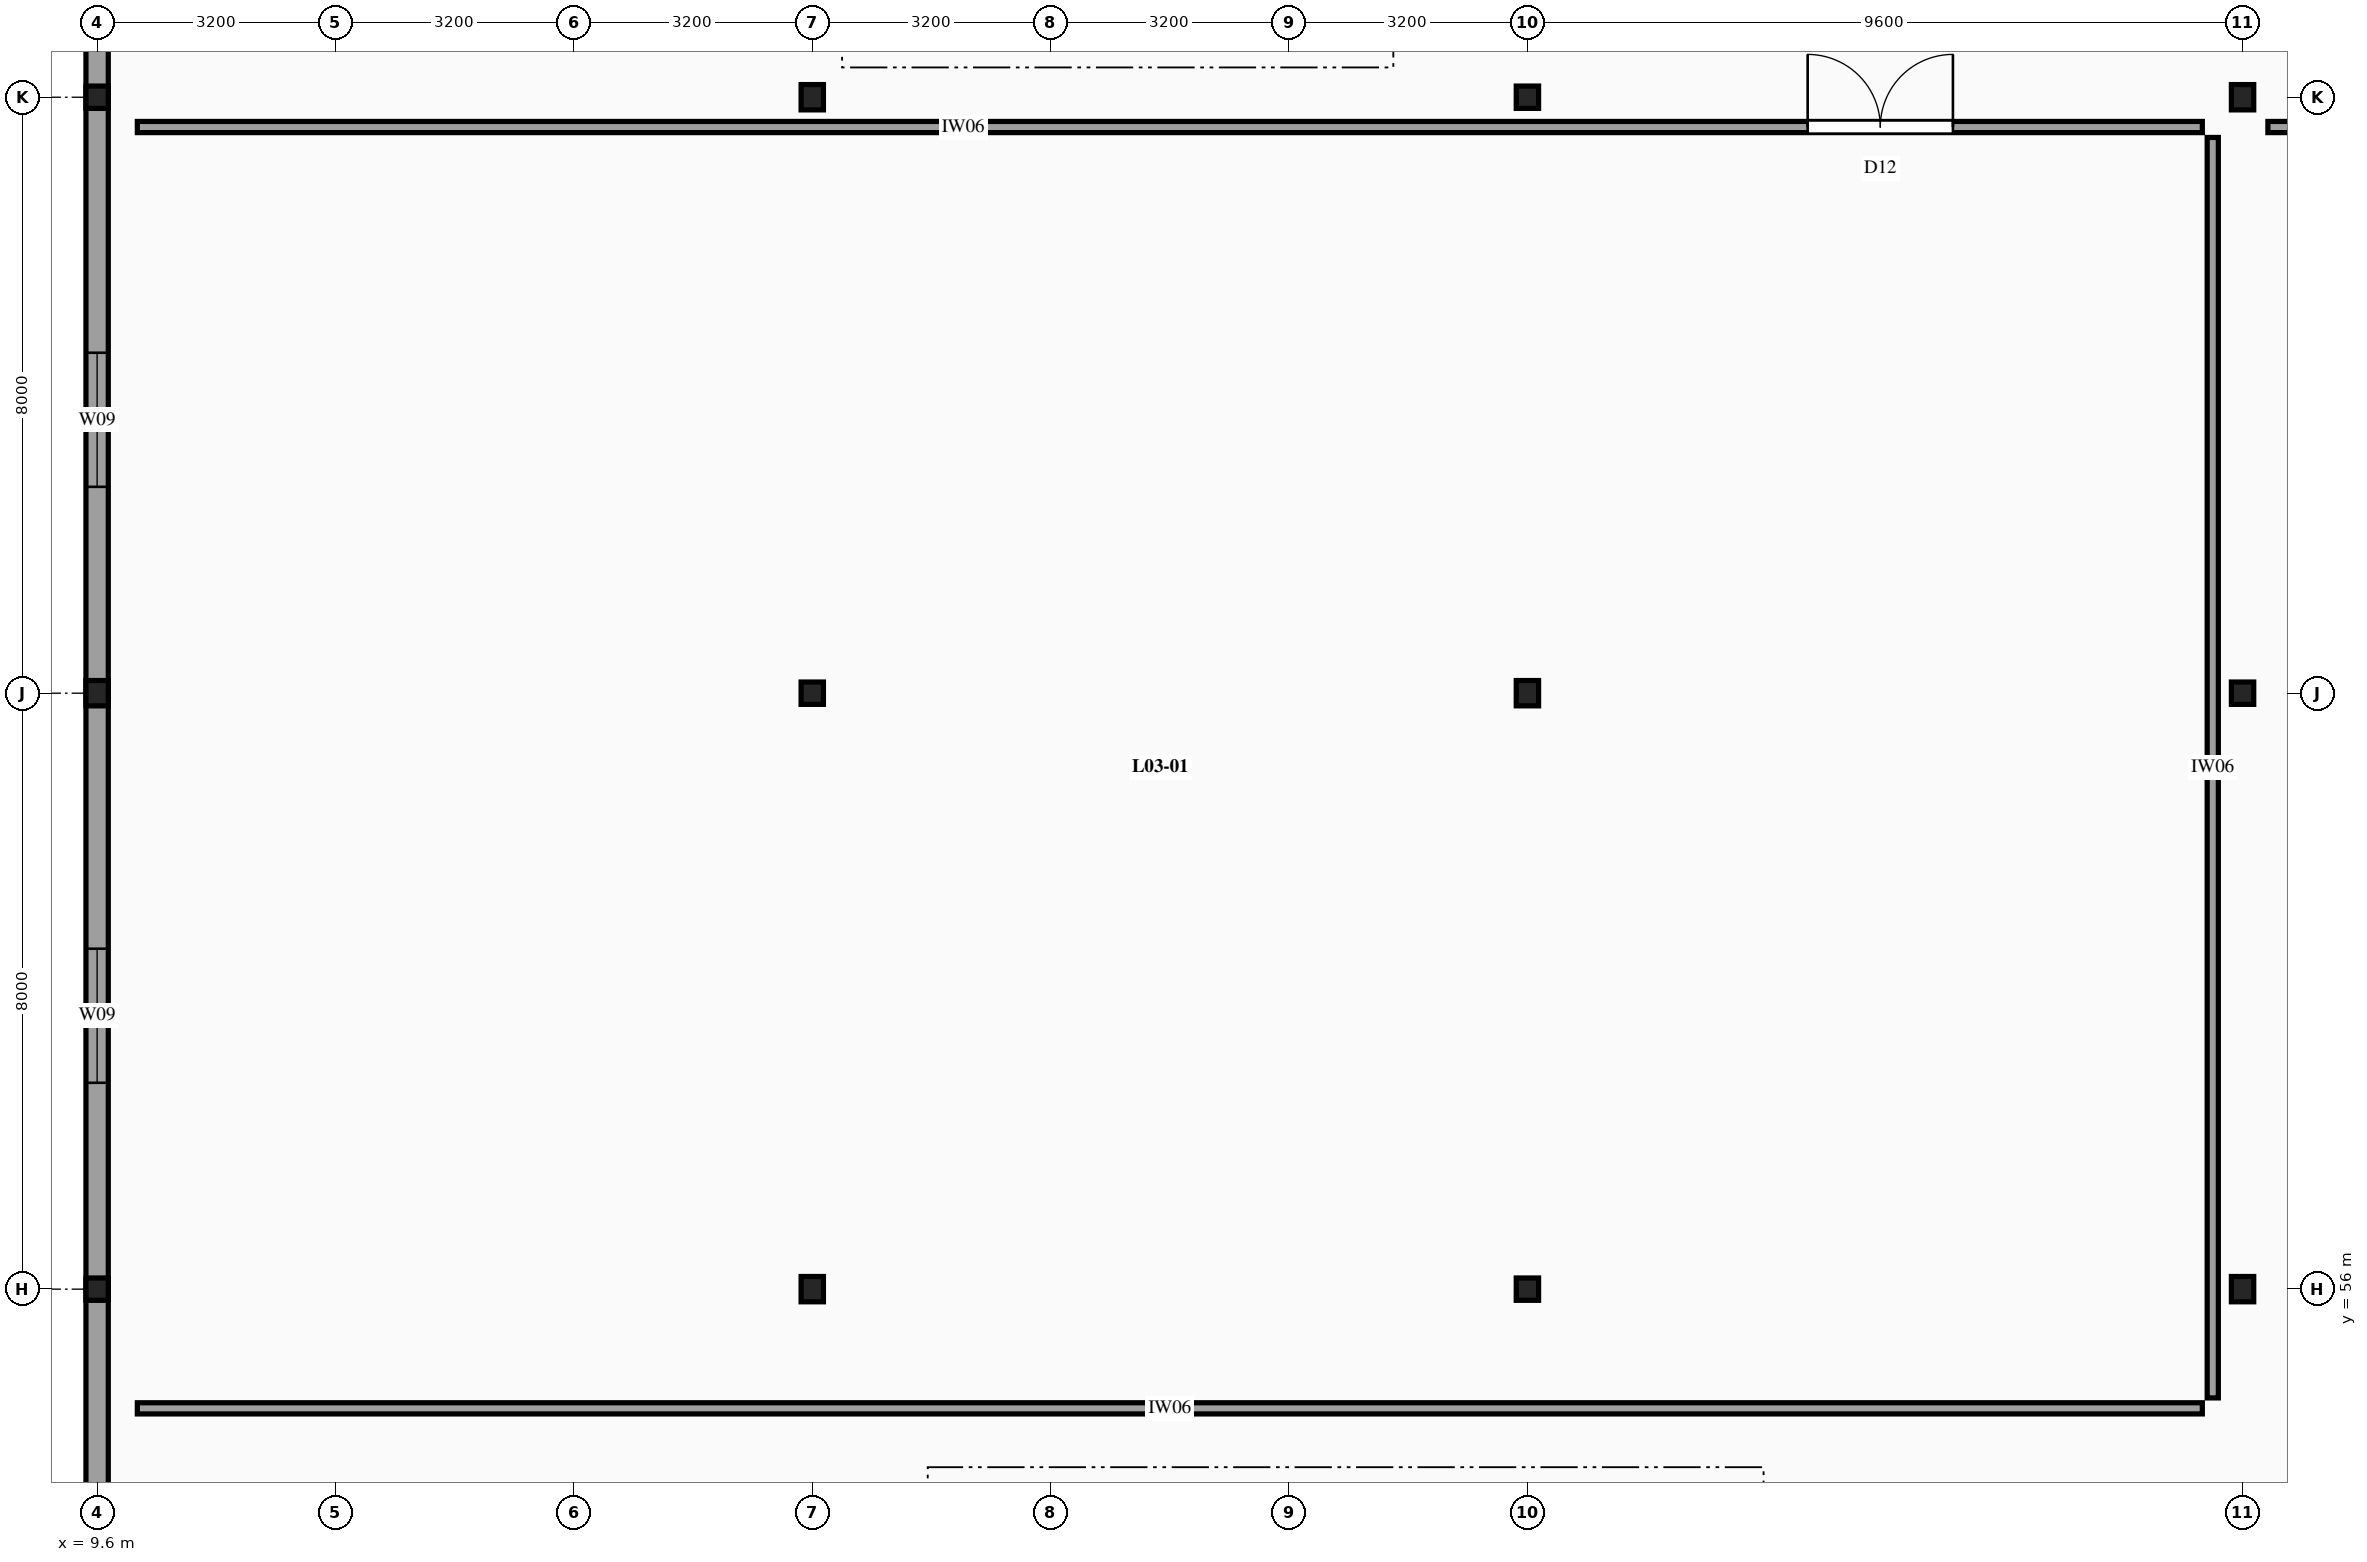
"""IFC4 building model, lengths in metres.
Left out: names, types, materials, properties, quantities, classifications, styles, units other than length and angle.
Written with IfcOpenShell. Run it as: python <this file> out.ifc"""

import sys

from ifc_helpers import new_model, si_unit, direction, frame, frame_2d, origin, origin_2d, place, context, subcontext, project, spatial, rectangle, i_section, extrude, element, fill, save


model = new_model("IFC4")
c1 = context("Model", 3, precision=1e-05, world=origin(), true_north=direction((0.0, 1.0)))
c2 = subcontext(c1, "Body", "Model", "MODEL_VIEW")
j1 = project(units=[si_unit("LENGTHUNIT", "METRE"), si_unit("PLANEANGLEUNIT", "RADIAN")], contexts=[c1])
p1 = place(None, origin())
s1 = spatial("IfcSite", under=j1, at=p1, CompositionType="ELEMENT")
p2 = place(p1, origin())
s2 = spatial("IfcBuilding", under=s1, at=p2, CompositionType="ELEMENT")
p3 = place(p2, frame((0.0, 0.0, 12.9)))
s3 = spatial("IfcBuildingStorey", under=s2, at=p3, CompositionType="ELEMENT", Elevation=12.9)
p4 = place(p3, frame((9.6, 56.0, -0.26), z_axis=(0.0, 0.0, 1.0), x_axis=(1.0, 0.0, 0.0)))
e1 = element("IfcColumn", 1, at=p4, inside=s3, PredefinedType="COLUMN", context=c2, shape_type="SweptSolid", body=[
    extrude(i_section(OverallWidth=0.3, OverallDepth=0.3, WebThickness=0.011, FlangeThickness=0.019, FilletRadius=0.027, at=origin_2d()), origin(), (0.0, 0.0, 1.0), 4.48),
])
p5 = place(p3, frame((9.6, 64.0, -0.26), z_axis=(0.0, 0.0, 1.0), x_axis=(1.0, 0.0, 0.0)))
e2 = element("IfcColumn", 2, at=p5, inside=s3, PredefinedType="COLUMN", context=c2, shape_type="SweptSolid", body=[
    extrude(i_section(OverallWidth=0.3, OverallDepth=0.34, WebThickness=0.012, FlangeThickness=0.021, FilletRadius=0.027, at=origin_2d()), origin(), (0.0, 0.0, 1.0), 4.48),
])
p6 = place(p3, frame((9.6, 72.0, -0.26), z_axis=(0.0, 0.0, 1.0), x_axis=(1.0, 0.0, 0.0)))
e3 = element("IfcColumn", 3, at=p6, inside=s3, PredefinedType="COLUMN", context=c2, shape_type="SweptSolid", body=[
    extrude(i_section(OverallWidth=0.3, OverallDepth=0.3, WebThickness=0.011, FlangeThickness=0.019, FilletRadius=0.027, at=origin_2d()), origin(), (0.0, 0.0, 1.0), 4.48),
])
p7 = place(p3, frame((19.2, 56.0, -0.26), z_axis=(0.0, 0.0, 1.0), x_axis=(1.0, 0.0, 0.0)))
e4 = element("IfcColumn", 4, at=p7, inside=s3, PredefinedType="COLUMN", context=c2, shape_type="SweptSolid", body=[
    extrude(i_section(OverallWidth=0.3, OverallDepth=0.34, WebThickness=0.012, FlangeThickness=0.021, FilletRadius=0.027, at=origin_2d()), origin(), (0.0, 0.0, 1.0), 4.48),
])
p8 = place(p3, frame((19.2, 64.0, -0.26), z_axis=(0.0, 0.0, 1.0), x_axis=(1.0, 0.0, 0.0)))
e5 = element("IfcColumn", 5, at=p8, inside=s3, PredefinedType="COLUMN", context=c2, shape_type="SweptSolid", body=[
    extrude(i_section(OverallWidth=0.3, OverallDepth=0.3, WebThickness=0.011, FlangeThickness=0.019, FilletRadius=0.027, at=origin_2d()), origin(), (0.0, 0.0, 1.0), 4.48),
])
p9 = place(p3, frame((19.2, 72.0, -0.26), z_axis=(0.0, 0.0, 1.0), x_axis=(1.0, 0.0, 0.0)))
e6 = element("IfcColumn", 6, at=p9, inside=s3, PredefinedType="COLUMN", context=c2, shape_type="SweptSolid", body=[
    extrude(i_section(OverallWidth=0.3, OverallDepth=0.34, WebThickness=0.012, FlangeThickness=0.021, FilletRadius=0.027, at=origin_2d()), origin(), (0.0, 0.0, 1.0), 4.48),
])
p10 = place(p3, frame((28.8, 56.0, -0.26), z_axis=(0.0, 0.0, 1.0), x_axis=(1.0, 0.0, 0.0)))
e7 = element("IfcColumn", 7, at=p10, inside=s3, PredefinedType="COLUMN", context=c2, shape_type="SweptSolid", body=[
    extrude(i_section(OverallWidth=0.3, OverallDepth=0.3, WebThickness=0.011, FlangeThickness=0.019, FilletRadius=0.027, at=origin_2d()), origin(), (0.0, 0.0, 1.0), 4.48),
])
p11 = place(p3, frame((28.8, 64.0, -0.26), z_axis=(0.0, 0.0, 1.0), x_axis=(1.0, 0.0, 0.0)))
e8 = element("IfcColumn", 8, at=p11, inside=s3, PredefinedType="COLUMN", context=c2, shape_type="SweptSolid", body=[
    extrude(i_section(OverallWidth=0.3, OverallDepth=0.34, WebThickness=0.012, FlangeThickness=0.021, FilletRadius=0.027, at=origin_2d()), origin(), (0.0, 0.0, 1.0), 4.48),
])
p12 = place(p3, frame((28.8, 72.0, -0.26), z_axis=(0.0, 0.0, 1.0), x_axis=(1.0, 0.0, 0.0)))
e9 = element("IfcColumn", 9, at=p12, inside=s3, PredefinedType="COLUMN", context=c2, shape_type="SweptSolid", body=[
    extrude(i_section(OverallWidth=0.3, OverallDepth=0.3, WebThickness=0.011, FlangeThickness=0.019, FilletRadius=0.027, at=origin_2d()), origin(), (0.0, 0.0, 1.0), 4.48),
])
p13 = place(p3, frame((38.4, 56.0, -0.26), z_axis=(0.0, 0.0, 1.0), x_axis=(1.0, 0.0, 0.0)))
e10 = element("IfcColumn", 10, at=p13, inside=s3, PredefinedType="COLUMN", context=c2, shape_type="SweptSolid", body=[
    extrude(i_section(OverallWidth=0.3, OverallDepth=0.34, WebThickness=0.012, FlangeThickness=0.021, FilletRadius=0.027, at=origin_2d()), origin(), (0.0, 0.0, 1.0), 4.48),
])
p14 = place(p3, frame((38.4, 64.0, -0.26), z_axis=(0.0, 0.0, 1.0), x_axis=(1.0, 0.0, 0.0)))
e11 = element("IfcColumn", 11, at=p14, inside=s3, PredefinedType="COLUMN", context=c2, shape_type="SweptSolid", body=[
    extrude(i_section(OverallWidth=0.3, OverallDepth=0.3, WebThickness=0.011, FlangeThickness=0.019, FilletRadius=0.027, at=origin_2d()), origin(), (0.0, 0.0, 1.0), 4.48),
])
p15 = place(p3, frame((38.4, 72.0, -0.26), z_axis=(0.0, 0.0, 1.0), x_axis=(1.0, 0.0, 0.0)))
e12 = element("IfcColumn", 12, at=p15, inside=s3, PredefinedType="COLUMN", context=c2, shape_type="SweptSolid", body=[
    extrude(i_section(OverallWidth=0.3, OverallDepth=0.34, WebThickness=0.012, FlangeThickness=0.021, FilletRadius=0.027, at=origin_2d()), origin(), (0.0, 0.0, 1.0), 4.48),
])
p16 = place(p3, frame((9.6, 48.02, 0.0), z_axis=(0.0, 0.0, 1.0), x_axis=(0.0, 1.0, 0.0)))
e13 = element("IfcWall", 13, at=p16, inside=s3, PredefinedType="SOLIDWALL", context=c2, shape_type="SweptSolid", body=[
    extrude(rectangle(XDim=7.96, YDim=0.3, at=frame_2d((3.98, 0.0))), origin(), (0.0, 0.0, 1.0), 3.54),
])
p17 = place(p16, frame((2.75, 0.0, 0.85)))
e14 = element("IfcOpeningElement", 14, at=p17, cuts=e13, PredefinedType="OPENING", context=c2, shape_type="SweptSolid", body=[
    extrude(rectangle(XDim=1.8, YDim=2.1, at=frame_2d((0.9, 1.05))), frame((0.0, 0.16, 0.0), z_axis=(0.0, -1.0, 0.0), x_axis=(1.0, 0.0, 0.0)), (0.0, 0.0, 1.0), 0.32),
])
p18 = place(p3, frame((9.6, 56.02, 0.0), z_axis=(0.0, 0.0, 1.0), x_axis=(0.0, 1.0, 0.0)))
e15 = element("IfcWall", 15, at=p18, inside=s3, PredefinedType="SOLIDWALL", context=c2, shape_type="SweptSolid", body=[
    extrude(rectangle(XDim=7.96, YDim=0.3, at=frame_2d((3.98, 0.0))), origin(), (0.0, 0.0, 1.0), 3.54),
])
p19 = place(p18, frame((2.75, 0.0, 0.85)))
e16 = element("IfcOpeningElement", 16, at=p19, cuts=e15, PredefinedType="OPENING", context=c2, shape_type="SweptSolid", body=[
    extrude(rectangle(XDim=1.8, YDim=2.1, at=frame_2d((0.9, 1.05))), frame((0.0, 0.16, 0.0), z_axis=(0.0, -1.0, 0.0), x_axis=(1.0, 0.0, 0.0)), (0.0, 0.0, 1.0), 0.32),
])
p20 = place(p3, frame((9.6, 64.02, 0.0), z_axis=(0.0, 0.0, 1.0), x_axis=(0.0, 1.0, 0.0)))
e17 = element("IfcWall", 17, at=p20, inside=s3, PredefinedType="SOLIDWALL", context=c2, shape_type="SweptSolid", body=[
    extrude(rectangle(XDim=7.96, YDim=0.3, at=frame_2d((3.98, 0.0))), origin(), (0.0, 0.0, 1.0), 3.54),
])
p21 = place(p20, frame((2.75, 0.0, 0.85)))
e18 = element("IfcOpeningElement", 18, at=p21, cuts=e17, PredefinedType="OPENING", context=c2, shape_type="SweptSolid", body=[
    extrude(rectangle(XDim=1.8, YDim=2.1, at=frame_2d((0.9, 1.05))), frame((0.0, 0.16, 0.0), z_axis=(0.0, -1.0, 0.0), x_axis=(1.0, 0.0, 0.0)), (0.0, 0.0, 1.0), 0.32),
])
p22 = place(p3, frame((9.6, 72.02, 0.0), z_axis=(0.0, 0.0, 1.0), x_axis=(0.0, 1.0, 0.0)))
e19 = element("IfcWall", 19, at=p22, inside=s3, PredefinedType="SOLIDWALL", context=c2, shape_type="SweptSolid", body=[
    extrude(rectangle(XDim=7.96, YDim=0.3, at=frame_2d((3.98, 0.0))), origin(), (0.0, 0.0, 1.0), 3.54),
])
p23 = place(p22, frame((2.75, 0.0, 0.85)))
e20 = element("IfcOpeningElement", 20, at=p23, cuts=e19, PredefinedType="OPENING", context=c2, shape_type="SweptSolid", body=[
    extrude(rectangle(XDim=1.8, YDim=2.1, at=frame_2d((0.9, 1.05))), frame((0.0, 0.16, 0.0), z_axis=(0.0, -1.0, 0.0), x_axis=(1.0, 0.0, 0.0)), (0.0, 0.0, 1.0), 0.32),
])
p24 = place(p3, frame((10.14, 71.6, 0.0), z_axis=(0.0, 0.0, 1.0), x_axis=(1.0, 0.0, 0.0)))
e21 = element("IfcWall", 21, at=p24, inside=s3, PredefinedType="PARTITIONING", context=c2, shape_type="SweptSolid", body=[
    extrude(rectangle(XDim=27.72, YDim=0.15, at=frame_2d((13.86, 0.0))), origin(), (0.0, 0.0, 1.0), 3.38),
])
p25 = place(p24, frame((22.422, 0.0, 0.0)))
e22 = element("IfcOpeningElement", 22, at=p25, cuts=e21, PredefinedType="OPENING", context=c2, shape_type="SweptSolid", body=[
    extrude(rectangle(XDim=1.95, YDim=2.55, at=frame_2d((0.975, 1.275))), frame((0.0, 0.085, 0.0), z_axis=(0.0, -1.0, 0.0), x_axis=(1.0, 0.0, 0.0)), (0.0, 0.0, 1.0), 0.17),
])
p26 = place(p3, frame((10.14, 54.4, 0.0), z_axis=(0.0, 0.0, 1.0), x_axis=(1.0, 0.0, 0.0)))
e23 = element("IfcWall", 23, at=p26, inside=s3, PredefinedType="PARTITIONING", context=c2, shape_type="SweptSolid", body=[
    extrude(rectangle(XDim=27.72, YDim=0.15, at=frame_2d((13.86, 0.0))), origin(), (0.0, 0.0, 1.0), 3.38),
])
p27 = place(p3, frame((38.0, 54.54, 0.0), z_axis=(0.0, 0.0, 1.0), x_axis=(0.0, 1.0, 0.0)))
e24 = element("IfcWall", 24, at=p27, inside=s3, PredefinedType="PARTITIONING", context=c2, shape_type="SweptSolid", body=[
    extrude(rectangle(XDim=16.92, YDim=0.15, at=frame_2d((8.46, 0.0))), origin(), (0.0, 0.0, 1.0), 3.38),
])
p28 = place(p3, frame((38.74, 71.6, 0.0), z_axis=(0.0, 0.0, 1.0), x_axis=(1.0, 0.0, 0.0)))
e25 = element("IfcWall", 25, at=p28, inside=s3, PredefinedType="PARTITIONING", context=c2, shape_type="SweptSolid", body=[
    extrude(rectangle(XDim=27.92, YDim=0.15, at=frame_2d((13.96, 0.0))), origin(), (0.0, 0.0, 1.0), 3.38),
])
p29 = place(p28, frame((3.342, 0.0, 0.0)))
e26 = element("IfcOpeningElement", 26, at=p29, cuts=e25, PredefinedType="OPENING", context=c2, shape_type="SweptSolid", body=[
    extrude(rectangle(XDim=2.2, YDim=2.7, at=frame_2d((1.1, 1.35))), frame((0.0, 0.085, 0.0), z_axis=(0.0, -1.0, 0.0), x_axis=(1.0, 0.0, 0.0)), (0.0, 0.0, 1.0), 0.17),
])
p30 = place(p19, origin())
e27 = element("IfcWindow", 27, at=p30, inside=s3, PartitioningType="SINGLE_PANEL", PredefinedType="WINDOW", context=c2, shape_type="SweptSolid", body=[
    extrude(rectangle(XDim=1.8, YDim=2.1, at=frame_2d((0.9, 1.05))), frame((0.0, 0.03, 0.0), z_axis=(0.0, -1.0, 0.0), x_axis=(1.0, 0.0, 0.0)), (0.0, 0.0, 1.0), 0.06),
])
fill(e16, e27)
p31 = place(p21, origin())
e28 = element("IfcWindow", 28, at=p31, inside=s3, PartitioningType="SINGLE_PANEL", PredefinedType="WINDOW", context=c2, shape_type="SweptSolid", body=[
    extrude(rectangle(XDim=1.8, YDim=2.1, at=frame_2d((0.9, 1.05))), frame((0.0, 0.03, 0.0), z_axis=(0.0, -1.0, 0.0), x_axis=(1.0, 0.0, 0.0)), (0.0, 0.0, 1.0), 0.06),
])
fill(e18, e28)
p32 = place(p25, origin())
e29 = element("IfcDoor", 29, at=p32, inside=s3, OperationType="DOUBLE_DOOR_SINGLE_SWING", PredefinedType="DOOR", context=c2, shape_type="SweptSolid", body=[
    extrude(rectangle(XDim=1.95, YDim=2.55, at=frame_2d((0.975, 1.275))), frame((0.0, 0.025, 0.0), z_axis=(0.0, -1.0, 0.0), x_axis=(1.0, 0.0, 0.0)), (0.0, 0.0, 1.0), 0.05),
])
fill(e22, e29)
save(model, sys.argv[1])
